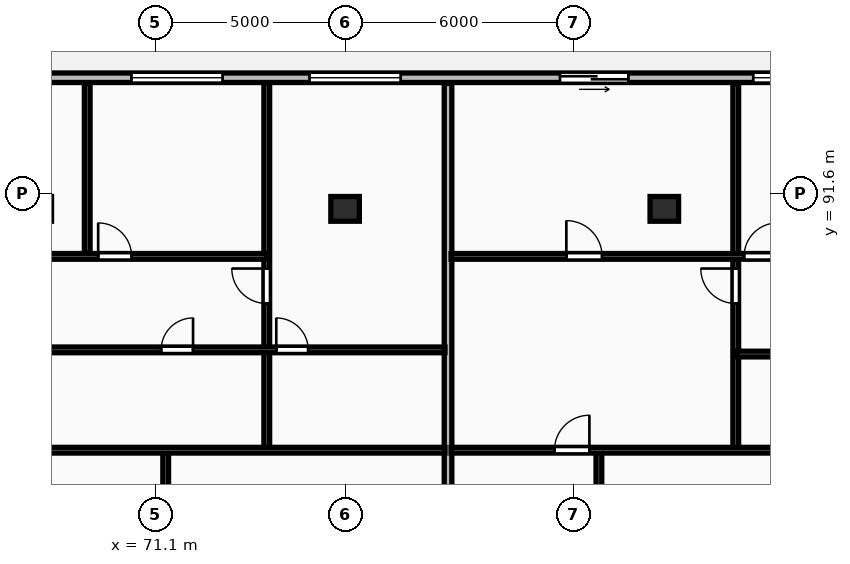
"""IFC4 building model, lengths in metres.
Left out: names, types, materials, properties, quantities, classifications, styles, units other than length and angle.
Written with IfcOpenShell. Run it as: python <this file> out.ifc"""

import sys

from ifc_helpers import new_model, si_unit, direction, frame, frame_2d, origin, origin_2d, place, context, subcontext, project, spatial, rectangle, extrude, element, fill, save


model = new_model("IFC4")
c1 = context("Model", 3, precision=1e-05, world=origin(), true_north=direction((0.0, 1.0)))
c2 = subcontext(c1, "Body", "Model", "MODEL_VIEW")
j1 = project(units=[si_unit("LENGTHUNIT", "METRE"), si_unit("PLANEANGLEUNIT", "RADIAN")], contexts=[c1])
p1 = place(None, origin())
s1 = spatial("IfcSite", under=j1, at=p1, CompositionType="ELEMENT")
p2 = place(p1, origin())
s2 = spatial("IfcBuilding", under=s1, at=p2, CompositionType="ELEMENT")
p3 = place(p2, frame((0.0, 0.0, 256.25)))
s3 = spatial("IfcBuildingStorey", under=s2, at=p3, CompositionType="ELEMENT", Elevation=256.25)
for number, where, z_axis, x_axis in (
    (1, (76.1, 91.2, 0.0), (0.0, 0.0, 1.0), (1.0, 0.0, 0.0)),
    (2, (84.5, 91.2, 0.0), (0.0, 0.0, 1.0), (1.0, 0.0, 0.0)),
):
    element("IfcColumn", number, at=place(p3, frame(where, z_axis=z_axis, x_axis=x_axis)), inside=s3, PredefinedType="COLUMN", context=c2, shape_type="SweptSolid", body=[
        extrude(rectangle(XDim=0.75, YDim=0.65, at=origin_2d()), origin(), (0.0, 0.0, 1.0), 3.45),
    ])
p4 = place(p3, frame((128.4, 94.65, 0.0), z_axis=(0.0, 0.0, 1.0), x_axis=(-1.0, 0.0, 0.0)))
e3 = element("IfcWall", 3, at=p4, inside=s3, PredefinedType="STANDARD", context=c2, shape_type="SweptSolid", body=[
    extrude(rectangle(XDim=68.6, YDim=0.25, at=frame_2d((34.3, 0.0))), origin(), (0.0, 0.0, 1.0), 3.17),
])
p5 = place(p4, frame((60.248, 0.0, 0.85)))
e4 = element("IfcOpeningElement", 4, at=p5, cuts=e3, PredefinedType="OPENING", context=c2, shape_type="SweptSolid", body=[
    extrude(rectangle(XDim=2.4, YDim=1.9, at=frame_2d((1.2, 0.95))), frame((0.0, 0.135, 0.0), z_axis=(0.0, -1.0, 0.0), x_axis=(1.0, 0.0, 0.0)), (0.0, 0.0, 1.0), 0.27),
])
p6 = place(p4, frame((55.523, 0.0, 0.85)))
e5 = element("IfcOpeningElement", 5, at=p6, cuts=e3, PredefinedType="OPENING", context=c2, shape_type="SweptSolid", body=[
    extrude(rectangle(XDim=2.4, YDim=1.9, at=frame_2d((1.2, 0.95))), frame((0.0, 0.135, 0.0), z_axis=(0.0, -1.0, 0.0), x_axis=(1.0, 0.0, 0.0)), (0.0, 0.0, 1.0), 0.27),
])
p7 = place(p4, frame((65.245, 0.0, 0.0)))
e6 = element("IfcOpeningElement", 6, at=p7, cuts=e3, PredefinedType="OPENING", context=c2, shape_type="SweptSolid", body=[
    extrude(rectangle(XDim=1.8, YDim=2.2, at=frame_2d((0.9, 1.1))), frame((0.0, 0.135, 0.0), z_axis=(0.0, -1.0, 0.0), x_axis=(1.0, 0.0, 0.0)), (0.0, 0.0, 1.0), 0.27),
])
p8 = place(p4, frame((50.836, 0.0, 0.85)))
e7 = element("IfcOpeningElement", 7, at=p8, cuts=e3, PredefinedType="OPENING", context=c2, shape_type="SweptSolid", body=[
    extrude(rectangle(XDim=2.4, YDim=1.9, at=frame_2d((1.2, 0.95))), frame((0.0, 0.135, 0.0), z_axis=(0.0, -1.0, 0.0), x_axis=(1.0, 0.0, 0.0)), (0.0, 0.0, 1.0), 0.27),
])
p9 = place(p4, frame((39.76, 0.0, 0.85)))
e8 = element("IfcOpeningElement", 8, at=p9, cuts=e3, PredefinedType="OPENING", context=c2, shape_type="SweptSolid", body=[
    extrude(rectangle(XDim=1.8, YDim=1.8, at=frame_2d((0.9, 0.9))), frame((0.0, 0.135, 0.0), z_axis=(0.0, -1.0, 0.0), x_axis=(1.0, 0.0, 0.0)), (0.0, 0.0, 1.0), 0.27),
])
p10 = place(p4, frame((37.04, 0.0, 0.85)))
e9 = element("IfcOpeningElement", 9, at=p10, cuts=e3, PredefinedType="OPENING", context=c2, shape_type="SweptSolid", body=[
    extrude(rectangle(XDim=1.8, YDim=1.8, at=frame_2d((0.9, 0.9))), frame((0.0, 0.135, 0.0), z_axis=(0.0, -1.0, 0.0), x_axis=(1.0, 0.0, 0.0)), (0.0, 0.0, 1.0), 0.27),
])
p11 = place(p4, frame((44.845, 0.0, 0.0)))
e10 = element("IfcOpeningElement", 10, at=p11, cuts=e3, PredefinedType="OPENING", context=c2, shape_type="SweptSolid", body=[
    extrude(rectangle(XDim=1.8, YDim=2.2, at=frame_2d((0.9, 1.1))), frame((0.0, 0.135, 0.0), z_axis=(0.0, -1.0, 0.0), x_axis=(1.0, 0.0, 0.0)), (0.0, 0.0, 1.0), 0.27),
])
p12 = place(p4, frame((33.056, 0.0, 0.85)))
e11 = element("IfcOpeningElement", 11, at=p12, cuts=e3, PredefinedType="OPENING", context=c2, shape_type="SweptSolid", body=[
    extrude(rectangle(XDim=2.4, YDim=1.9, at=frame_2d((1.2, 0.95))), frame((0.0, 0.135, 0.0), z_axis=(0.0, -1.0, 0.0), x_axis=(1.0, 0.0, 0.0)), (0.0, 0.0, 1.0), 0.27),
])
p13 = place(p4, frame((27.394, 0.0, 0.0)))
e12 = element("IfcOpeningElement", 12, at=p13, cuts=e3, PredefinedType="OPENING", context=c2, shape_type="SweptSolid", body=[
    extrude(rectangle(XDim=1.8, YDim=2.2, at=frame_2d((0.9, 1.1))), frame((0.0, 0.135, 0.0), z_axis=(0.0, -1.0, 0.0), x_axis=(1.0, 0.0, 0.0)), (0.0, 0.0, 1.0), 0.27),
])
p14 = place(p4, frame((18.879, 0.0, 0.85)))
e13 = element("IfcOpeningElement", 13, at=p14, cuts=e3, PredefinedType="OPENING", context=c2, shape_type="SweptSolid", body=[
    extrude(rectangle(XDim=2.4, YDim=1.9, at=frame_2d((1.2, 0.95))), frame((0.0, 0.135, 0.0), z_axis=(0.0, -1.0, 0.0), x_axis=(1.0, 0.0, 0.0)), (0.0, 0.0, 1.0), 0.27),
])
p15 = place(p4, frame((11.048, 0.0, 0.0)))
e14 = element("IfcOpeningElement", 14, at=p15, cuts=e3, PredefinedType="OPENING", context=c2, shape_type="SweptSolid", body=[
    extrude(rectangle(XDim=1.8, YDim=2.2, at=frame_2d((0.9, 1.1))), frame((0.0, 0.135, 0.0), z_axis=(0.0, -1.0, 0.0), x_axis=(1.0, 0.0, 0.0)), (0.0, 0.0, 1.0), 0.27),
])
p16 = place(p4, frame((3.298, 0.0, 0.85)))
e15 = element("IfcOpeningElement", 15, at=p16, cuts=e3, PredefinedType="OPENING", context=c2, shape_type="SweptSolid", body=[
    extrude(rectangle(XDim=2.4, YDim=1.9, at=frame_2d((1.2, 0.95))), frame((0.0, 0.135, 0.0), z_axis=(0.0, -1.0, 0.0), x_axis=(1.0, 0.0, 0.0)), (0.0, 0.0, 1.0), 0.27),
])
p17 = place(p3, frame((78.809, 70.18, 0.0), z_axis=(0.0, 0.0, 1.0), x_axis=(0.0, 1.0, 0.0)))
e16 = element("IfcWall", 16, at=p17, inside=s3, PredefinedType="PARTITIONING", context=c2, shape_type="SweptSolid", body=[
    extrude(rectangle(XDim=24.32, YDim=0.2, at=frame_2d((12.16, 0.0))), origin(), (0.0, 0.0, 1.0), 3.17),
])
p18 = place(p3, frame((71.379, 70.16, 0.0), z_axis=(0.0, 0.0, 1.0), x_axis=(0.0, 1.0, 0.0)))
e17 = element("IfcWall", 17, at=p18, inside=s3, PredefinedType="PARTITIONING", context=c2, shape_type="SweptSolid", body=[
    extrude(rectangle(XDim=14.65, YDim=0.15, at=frame_2d((7.325, 0.0))), origin(), (0.0, 0.0, 1.0), 3.17),
])
p19 = place(p18, frame((6.235, 0.0, 0.0)))
e18 = element("IfcOpeningElement", 18, at=p19, cuts=e17, PredefinedType="OPENING", context=c2, shape_type="SweptSolid", body=[
    extrude(rectangle(XDim=0.84, YDim=2.04, at=frame_2d((0.42, 1.02))), frame((0.0, 0.085, 0.0), z_axis=(0.0, -1.0, 0.0), x_axis=(1.0, 0.0, 0.0)), (0.0, 0.0, 1.0), 0.17),
])
p20 = place(p18, frame((7.575, 0.0, 0.0)))
e19 = element("IfcOpeningElement", 19, at=p20, cuts=e17, PredefinedType="OPENING", context=c2, shape_type="SweptSolid", body=[
    extrude(rectangle(XDim=0.88, YDim=2.06, at=frame_2d((0.44, 1.03))), frame((0.0, 0.085, 0.0), z_axis=(0.0, -1.0, 0.0), x_axis=(1.0, 0.0, 0.0)), (0.0, 0.0, 1.0), 0.17),
])
p21 = place(p3, frame((69.314, 90.03, 0.0), z_axis=(0.0, 0.0, 1.0), x_axis=(0.0, 1.0, 0.0)))
e20 = element("IfcWall", 20, at=p21, inside=s3, PredefinedType="PARTITIONING", context=c2, shape_type="SweptSolid", body=[
    extrude(rectangle(XDim=4.47, YDim=0.15, at=frame_2d((2.235, 0.0))), origin(), (0.0, 0.0, 1.0), 3.17),
])
p22 = place(p3, frame((74.039, 84.89, 0.0), z_axis=(0.0, 0.0, 1.0), x_axis=(0.0, 1.0, 0.0)))
e21 = element("IfcWall", 21, at=p22, inside=s3, PredefinedType="PARTITIONING", context=c2, shape_type="SweptSolid", body=[
    extrude(rectangle(XDim=2.58, YDim=0.15, at=frame_2d((1.29, 0.0))), origin(), (0.0, 0.0, 1.0), 3.17),
])
p23 = place(p3, frame((74.039, 87.51, 0.0), z_axis=(0.0, 0.0, 1.0), x_axis=(0.0, 1.0, 0.0)))
e22 = element("IfcWall", 22, at=p23, inside=s3, PredefinedType="PARTITIONING", context=c2, shape_type="SweptSolid", body=[
    extrude(rectangle(XDim=6.99, YDim=0.15, at=frame_2d((3.495, 0.0))), origin(), (0.0, 0.0, 1.0), 3.17),
])
p24 = place(p23, frame((1.2, 0.0, 0.0)))
e23 = element("IfcOpeningElement", 23, at=p24, cuts=e22, PredefinedType="OPENING", context=c2, shape_type="SweptSolid", body=[
    extrude(rectangle(XDim=0.92, YDim=2.08, at=frame_2d((0.46, 1.04))), frame((0.0, 0.085, 0.0), z_axis=(0.0, -1.0, 0.0), x_axis=(1.0, 0.0, 0.0)), (0.0, 0.0, 1.0), 0.17),
])
p25 = place(p3, frame((64.63, 87.49, 0.0), z_axis=(0.0, 0.0, 1.0), x_axis=(1.0, 0.0, 0.0)))
e24 = element("IfcWall", 24, at=p25, inside=s3, PredefinedType="PARTITIONING", context=c2, shape_type="SweptSolid", body=[
    extrude(rectangle(XDim=14.099, YDim=0.15, at=frame_2d((7.05, 0.0))), origin(), (0.0, 0.0, 1.0), 3.17),
])
p26 = place(p25, frame((1.21, 0.0, 0.0)))
e25 = element("IfcOpeningElement", 25, at=p26, cuts=e24, PredefinedType="OPENING", context=c2, shape_type="SweptSolid", body=[
    extrude(rectangle(XDim=0.84, YDim=2.04, at=frame_2d((0.42, 1.02))), frame((0.0, 0.085, 0.0), z_axis=(0.0, -1.0, 0.0), x_axis=(1.0, 0.0, 0.0)), (0.0, 0.0, 1.0), 0.17),
])
p27 = place(p25, frame((6.63, 0.0, 0.0)))
e26 = element("IfcOpeningElement", 26, at=p27, cuts=e24, PredefinedType="OPENING", context=c2, shape_type="SweptSolid", body=[
    extrude(rectangle(XDim=0.84, YDim=2.04, at=frame_2d((0.42, 1.02))), frame((0.0, 0.085, 0.0), z_axis=(0.0, -1.0, 0.0), x_axis=(1.0, 0.0, 0.0)), (0.0, 0.0, 1.0), 0.17),
])
p28 = place(p25, frame((9.659, 0.0, 0.0)))
e27 = element("IfcOpeningElement", 27, at=p28, cuts=e24, PredefinedType="OPENING", context=c2, shape_type="SweptSolid", body=[
    extrude(rectangle(XDim=0.84, YDim=2.04, at=frame_2d((0.42, 1.02))), frame((0.0, 0.085, 0.0), z_axis=(0.0, -1.0, 0.0), x_axis=(1.0, 0.0, 0.0)), (0.0, 0.0, 1.0), 0.17),
])
p29 = place(p3, frame((59.88, 84.85, 0.0), z_axis=(0.0, 0.0, 1.0), x_axis=(1.0, 0.0, 0.0)))
e28 = element("IfcWall", 28, at=p29, inside=s3, PredefinedType="PARTITIONING", context=c2, shape_type="SweptSolid", body=[
    extrude(rectangle(XDim=18.849, YDim=0.15, at=frame_2d((9.425, 0.0))), origin(), (0.0, 0.0, 1.0), 3.17),
])
p30 = place(p29, frame((2.72, 0.0, 0.0)))
e29 = element("IfcOpeningElement", 29, at=p30, cuts=e28, PredefinedType="OPENING", context=c2, shape_type="SweptSolid", body=[
    extrude(rectangle(XDim=0.92, YDim=2.08, at=frame_2d((0.46, 1.04))), frame((0.0, 0.085, 0.0), z_axis=(0.0, -1.0, 0.0), x_axis=(1.0, 0.0, 0.0)), (0.0, 0.0, 1.0), 0.17),
])
p31 = place(p3, frame((59.88, 89.95, 0.0), z_axis=(0.0, 0.0, 1.0), x_axis=(1.0, 0.0, 0.0)))
e30 = element("IfcWall", 30, at=p31, inside=s3, PredefinedType="PARTITIONING", context=c2, shape_type="SweptSolid", body=[
    extrude(rectangle(XDim=14.159, YDim=0.15, at=frame_2d((7.08, 0.0))), origin(), (0.0, 0.0, 1.0), 3.17),
])
p32 = place(p31, frame((3.52, 0.0, 0.0)))
e31 = element("IfcOpeningElement", 31, at=p32, cuts=e30, PredefinedType="OPENING", context=c2, shape_type="SweptSolid", body=[
    extrude(rectangle(XDim=0.94, YDim=2.1, at=frame_2d((0.47, 1.05))), frame((0.0, 0.085, 0.0), z_axis=(0.0, -1.0, 0.0), x_axis=(1.0, 0.0, 0.0)), (0.0, 0.0, 1.0), 0.17),
])
p33 = place(p31, frame((5.679, 0.0, 0.0)))
e32 = element("IfcOpeningElement", 32, at=p33, cuts=e30, PredefinedType="OPENING", context=c2, shape_type="SweptSolid", body=[
    extrude(rectangle(XDim=0.88, YDim=2.06, at=frame_2d((0.44, 1.03))), frame((0.0, 0.085, 0.0), z_axis=(0.0, -1.0, 0.0), x_axis=(1.0, 0.0, 0.0)), (0.0, 0.0, 1.0), 0.17),
])
p34 = place(p31, frame((9.723, 0.0, 0.0)))
e33 = element("IfcOpeningElement", 33, at=p34, cuts=e30, PredefinedType="OPENING", context=c2, shape_type="SweptSolid", body=[
    extrude(rectangle(XDim=0.88, YDim=2.06, at=frame_2d((0.44, 1.03))), frame((0.0, 0.085, 0.0), z_axis=(0.0, -1.0, 0.0), x_axis=(1.0, 0.0, 0.0)), (0.0, 0.0, 1.0), 0.17),
])
p35 = place(p3, frame((82.779, 70.16, 0.0), z_axis=(0.0, 0.0, 1.0), x_axis=(0.0, 1.0, 0.0)))
e34 = element("IfcWall", 34, at=p35, inside=s3, PredefinedType="PARTITIONING", context=c2, shape_type="SweptSolid", body=[
    extrude(rectangle(XDim=14.65, YDim=0.15, at=frame_2d((7.325, 0.0))), origin(), (0.0, 0.0, 1.0), 3.17),
])
p36 = place(p35, frame((6.375, 0.0, 0.0)))
e35 = element("IfcOpeningElement", 35, at=p36, cuts=e34, PredefinedType="OPENING", context=c2, shape_type="SweptSolid", body=[
    extrude(rectangle(XDim=0.88, YDim=2.06, at=frame_2d((0.44, 1.03))), frame((0.0, 0.085, 0.0), z_axis=(0.0, -1.0, 0.0), x_axis=(1.0, 0.0, 0.0)), (0.0, 0.0, 1.0), 0.17),
])
p37 = place(p3, frame((86.38, 84.89, 0.0), z_axis=(0.0, 0.0, 1.0), x_axis=(0.0, 1.0, 0.0)))
e36 = element("IfcWall", 36, at=p37, inside=s3, PredefinedType="PARTITIONING", context=c2, shape_type="SweptSolid", body=[
    extrude(rectangle(XDim=9.61, YDim=0.15, at=frame_2d((4.805, 0.0))), origin(), (0.0, 0.0, 1.0), 3.17),
])
p38 = place(p37, frame((3.82, 0.0, 0.0)))
e37 = element("IfcOpeningElement", 37, at=p38, cuts=e36, PredefinedType="OPENING", context=c2, shape_type="SweptSolid", body=[
    extrude(rectangle(XDim=0.92, YDim=2.08, at=frame_2d((0.46, 1.04))), frame((0.0, 0.085, 0.0), z_axis=(0.0, -1.0, 0.0), x_axis=(1.0, 0.0, 0.0)), (0.0, 0.0, 1.0), 0.17),
])
p39 = place(p3, frame((86.42, 87.38, 0.0), z_axis=(0.0, 0.0, 1.0), x_axis=(1.0, 0.0, 0.0)))
e38 = element("IfcWall", 38, at=p39, inside=s3, PredefinedType="PARTITIONING", context=c2, shape_type="SweptSolid", body=[
    extrude(rectangle(XDim=10.089, YDim=0.15, at=frame_2d((5.044, 0.0))), origin(), (0.0, 0.0, 1.0), 3.17),
])
p40 = place(p39, frame((4.31, 0.0, 0.0)))
e39 = element("IfcOpeningElement", 39, at=p40, cuts=e38, PredefinedType="OPENING", context=c2, shape_type="SweptSolid", body=[
    extrude(rectangle(XDim=0.84, YDim=2.04, at=frame_2d((0.42, 1.02))), frame((0.0, 0.085, 0.0), z_axis=(0.0, -1.0, 0.0), x_axis=(1.0, 0.0, 0.0)), (0.0, 0.0, 1.0), 0.17),
])
p41 = place(p39, frame((5.65, 0.0, 0.0)))
e40 = element("IfcOpeningElement", 40, at=p41, cuts=e38, PredefinedType="OPENING", context=c2, shape_type="SweptSolid", body=[
    extrude(rectangle(XDim=0.84, YDim=2.04, at=frame_2d((0.42, 1.02))), frame((0.0, 0.085, 0.0), z_axis=(0.0, -1.0, 0.0), x_axis=(1.0, 0.0, 0.0)), (0.0, 0.0, 1.0), 0.17),
])
p42 = place(p3, frame((78.889, 84.85, 0.0), z_axis=(0.0, 0.0, 1.0), x_axis=(1.0, 0.0, 0.0)))
e41 = element("IfcWall", 41, at=p42, inside=s3, PredefinedType="PARTITIONING", context=c2, shape_type="SweptSolid", body=[
    extrude(rectangle(XDim=17.619, YDim=0.15, at=frame_2d((8.81, 0.0))), origin(), (0.0, 0.0, 1.0), 3.17),
])
p43 = place(p42, frame((2.72, 0.0, 0.0)))
e42 = element("IfcOpeningElement", 42, at=p43, cuts=e41, PredefinedType="OPENING", context=c2, shape_type="SweptSolid", body=[
    extrude(rectangle(XDim=0.92, YDim=2.08, at=frame_2d((0.46, 1.04))), frame((0.0, 0.085, 0.0), z_axis=(0.0, -1.0, 0.0), x_axis=(1.0, 0.0, 0.0)), (0.0, 0.0, 1.0), 0.17),
])
p44 = place(p3, frame((78.889, 89.95, 0.0), z_axis=(0.0, 0.0, 1.0), x_axis=(1.0, 0.0, 0.0)))
e43 = element("IfcWall", 43, at=p44, inside=s3, PredefinedType="PARTITIONING", context=c2, shape_type="SweptSolid", body=[
    extrude(rectangle(XDim=12.931, YDim=0.15, at=frame_2d((6.465, 0.0))), origin(), (0.0, 0.0, 1.0), 3.17),
])
p45 = place(p44, frame((3.033, 0.0, 0.0)))
e44 = element("IfcOpeningElement", 44, at=p45, cuts=e43, PredefinedType="OPENING", context=c2, shape_type="SweptSolid", body=[
    extrude(rectangle(XDim=0.94, YDim=2.1, at=frame_2d((0.47, 1.05))), frame((0.0, 0.085, 0.0), z_axis=(0.0, -1.0, 0.0), x_axis=(1.0, 0.0, 0.0)), (0.0, 0.0, 1.0), 0.17),
])
p46 = place(p44, frame((7.711, 0.0, 0.0)))
e45 = element("IfcOpeningElement", 45, at=p46, cuts=e43, PredefinedType="OPENING", context=c2, shape_type="SweptSolid", body=[
    extrude(rectangle(XDim=0.88, YDim=2.06, at=frame_2d((0.44, 1.03))), frame((0.0, 0.085, 0.0), z_axis=(0.0, -1.0, 0.0), x_axis=(1.0, 0.0, 0.0)), (0.0, 0.0, 1.0), 0.17),
])
p47 = place(p44, frame((10.431, 0.0, 0.0)))
e46 = element("IfcOpeningElement", 46, at=p47, cuts=e43, PredefinedType="OPENING", context=c2, shape_type="SweptSolid", body=[
    extrude(rectangle(XDim=0.88, YDim=2.06, at=frame_2d((0.44, 1.03))), frame((0.0, 0.085, 0.0), z_axis=(0.0, -1.0, 0.0), x_axis=(1.0, 0.0, 0.0)), (0.0, 0.0, 1.0), 0.17),
])
p48 = place(p6, origin())
e47 = element("IfcWindow", 47, at=p48, inside=s3, PartitioningType="DOUBLE_PANEL_VERTICAL", PredefinedType="WINDOW", context=c2, shape_type="SweptSolid", body=[
    extrude(rectangle(XDim=2.4, YDim=1.9, at=frame_2d((1.2, 0.95))), frame((0.0, 0.03, 0.0), z_axis=(0.0, -1.0, 0.0), x_axis=(1.0, 0.0, 0.0)), (0.0, 0.0, 1.0), 0.06),
])
fill(e5, e47)
p49 = place(p8, origin())
e48 = element("IfcWindow", 48, at=p49, inside=s3, PartitioningType="DOUBLE_PANEL_VERTICAL", PredefinedType="WINDOW", context=c2, shape_type="SweptSolid", body=[
    extrude(rectangle(XDim=2.4, YDim=1.9, at=frame_2d((1.2, 0.95))), frame((0.0, 0.03, 0.0), z_axis=(0.0, -1.0, 0.0), x_axis=(1.0, 0.0, 0.0)), (0.0, 0.0, 1.0), 0.06),
])
fill(e7, e48)
p50 = place(p9, origin())
e49 = element("IfcWindow", 49, at=p50, inside=s3, PartitioningType="SINGLE_PANEL", PredefinedType="WINDOW", context=c2, shape_type="SweptSolid", body=[
    extrude(rectangle(XDim=1.8, YDim=1.8, at=frame_2d((0.9, 0.9))), frame((0.0, 0.03, 0.0), z_axis=(0.0, -1.0, 0.0), x_axis=(1.0, 0.0, 0.0)), (0.0, 0.0, 1.0), 0.06),
])
fill(e8, e49)
p51 = place(p11, origin())
e50 = element("IfcDoor", 50, at=p51, inside=s3, OperationType="SLIDING_TO_LEFT", PredefinedType="DOOR", context=c2, shape_type="SweptSolid", body=[
    extrude(rectangle(XDim=1.8, YDim=2.2, at=frame_2d((0.9, 1.1))), frame((0.0, 0.025, 0.0), z_axis=(0.0, -1.0, 0.0), x_axis=(1.0, 0.0, 0.0)), (0.0, 0.0, 1.0), 0.05),
])
fill(e10, e50)
p52 = place(p24, origin())
e51 = element("IfcDoor", 51, at=p52, inside=s3, OperationType="SINGLE_SWING_RIGHT", PredefinedType="DOOR", context=c2, shape_type="SweptSolid", body=[
    extrude(rectangle(XDim=0.92, YDim=2.08, at=frame_2d((0.46, 1.04))), frame((0.0, 0.025, 0.0), z_axis=(0.0, -1.0, 0.0), x_axis=(1.0, 0.0, 0.0)), (0.0, 0.0, 1.0), 0.05),
])
fill(e23, e51)
p53 = place(p27, origin())
e52 = element("IfcDoor", 52, at=p53, inside=s3, OperationType="SINGLE_SWING_RIGHT", PredefinedType="DOOR", context=c2, shape_type="SweptSolid", body=[
    extrude(rectangle(XDim=0.84, YDim=2.04, at=frame_2d((0.42, 1.02))), frame((0.0, 0.025, 0.0), z_axis=(0.0, -1.0, 0.0), x_axis=(1.0, 0.0, 0.0)), (0.0, 0.0, 1.0), 0.05),
])
fill(e26, e52)
p54 = place(p28, origin())
e53 = element("IfcDoor", 53, at=p54, inside=s3, OperationType="SINGLE_SWING_LEFT", PredefinedType="DOOR", context=c2, shape_type="SweptSolid", body=[
    extrude(rectangle(XDim=0.84, YDim=2.04, at=frame_2d((0.42, 1.02))), frame((0.0, 0.025, 0.0), z_axis=(0.0, -1.0, 0.0), x_axis=(1.0, 0.0, 0.0)), (0.0, 0.0, 1.0), 0.05),
])
fill(e27, e53)
p55 = place(p34, origin())
e54 = element("IfcDoor", 54, at=p55, inside=s3, OperationType="SINGLE_SWING_LEFT", PredefinedType="DOOR", context=c2, shape_type="SweptSolid", body=[
    extrude(rectangle(XDim=0.88, YDim=2.06, at=frame_2d((0.44, 1.03))), frame((0.0, 0.025, 0.0), z_axis=(0.0, -1.0, 0.0), x_axis=(1.0, 0.0, 0.0)), (0.0, 0.0, 1.0), 0.05),
])
fill(e33, e54)
p56 = place(p38, origin())
e55 = element("IfcDoor", 55, at=p56, inside=s3, OperationType="SINGLE_SWING_RIGHT", PredefinedType="DOOR", context=c2, shape_type="SweptSolid", body=[
    extrude(rectangle(XDim=0.92, YDim=2.08, at=frame_2d((0.46, 1.04))), frame((0.0, 0.025, 0.0), z_axis=(0.0, -1.0, 0.0), x_axis=(1.0, 0.0, 0.0)), (0.0, 0.0, 1.0), 0.05),
])
fill(e37, e55)
p57 = place(p43, origin())
e56 = element("IfcDoor", 56, at=p57, inside=s3, OperationType="SINGLE_SWING_RIGHT", PredefinedType="DOOR", context=c2, shape_type="SweptSolid", body=[
    extrude(rectangle(XDim=0.92, YDim=2.08, at=frame_2d((0.46, 1.04))), frame((0.0, 0.025, 0.0), z_axis=(0.0, -1.0, 0.0), x_axis=(1.0, 0.0, 0.0)), (0.0, 0.0, 1.0), 0.05),
])
fill(e42, e56)
p58 = place(p45, origin())
e57 = element("IfcDoor", 57, at=p58, inside=s3, OperationType="SINGLE_SWING_LEFT", PredefinedType="DOOR", context=c2, shape_type="SweptSolid", body=[
    extrude(rectangle(XDim=0.94, YDim=2.1, at=frame_2d((0.47, 1.05))), frame((0.0, 0.025, 0.0), z_axis=(0.0, -1.0, 0.0), x_axis=(1.0, 0.0, 0.0)), (0.0, 0.0, 1.0), 0.05),
])
fill(e44, e57)
p59 = place(p46, origin())
e58 = element("IfcDoor", 58, at=p59, inside=s3, OperationType="SINGLE_SWING_RIGHT", PredefinedType="DOOR", context=c2, shape_type="SweptSolid", body=[
    extrude(rectangle(XDim=0.88, YDim=2.06, at=frame_2d((0.44, 1.03))), frame((0.0, 0.025, 0.0), z_axis=(0.0, -1.0, 0.0), x_axis=(1.0, 0.0, 0.0)), (0.0, 0.0, 1.0), 0.05),
])
fill(e45, e58)
save(model, sys.argv[1])
